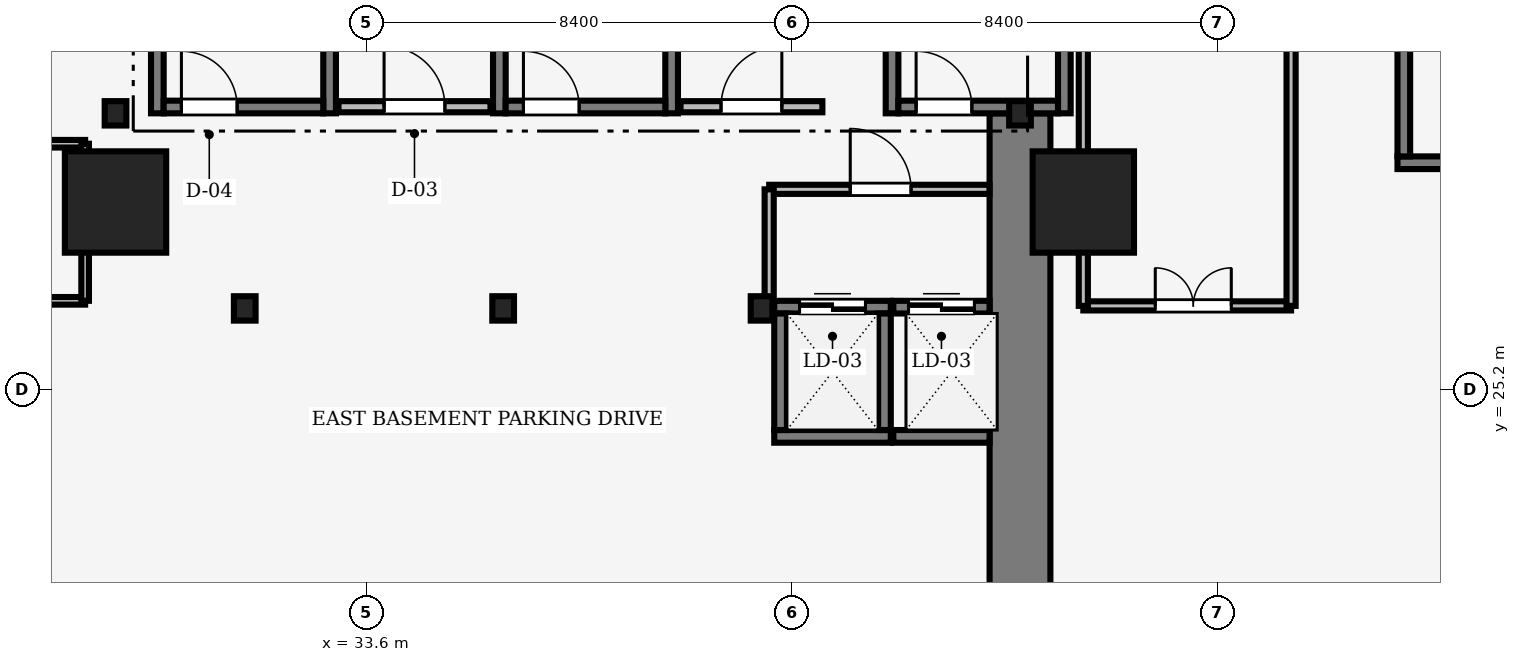
"""IFC4 building model, lengths in metres.
Left out: names, types, materials, properties, quantities, classifications, styles, units other than length and angle.
Written with IfcOpenShell. Run it as: python <this file> out.ifc"""

import sys

from ifc_helpers import new_model, si_unit, direction, frame, frame_2d, origin, origin_2d, place, context, subcontext, project, spatial, rectangle, i_section, extrude, source, transform, mapped, element, fill, save


model = new_model("IFC4")
c1 = context("Model", 3, precision=1e-05, world=origin(), true_north=direction((0.0, 1.0)))
c2 = subcontext(c1, "Body", "Model", "MODEL_VIEW")
j1 = project(units=[si_unit("LENGTHUNIT", "METRE"), si_unit("PLANEANGLEUNIT", "RADIAN")], contexts=[c1])
p1 = place(None, origin())
s1 = spatial("IfcSite", under=j1, at=p1, CompositionType="ELEMENT")
p2 = place(p1, origin())
s2 = spatial("IfcBuilding", under=s1, at=p2, CompositionType="ELEMENT")
p3 = place(p2, frame((0.0, 0.0, -11.4)))
s3 = spatial("IfcBuildingStorey", under=s2, at=p3, CompositionType="ELEMENT", Elevation=-11.4)
m1 = source(origin(), c2, "Body", "SweptSolid", [
    extrude(rectangle(XDim=13.15, YDim=1.2, at=frame_2d((6.575, 0.0))), origin(), (0.0, 0.0, 1.0), 5.04),
])
p4 = place(p3, frame((46.5, 17.5, 0.0), z_axis=(0.0, 0.0, 1.0), x_axis=(0.0, 1.0, 0.0)))
e1 = element("IfcWall", 1, at=p4, inside=s3, PredefinedType="SHEAR", context=c2, shape_type="MappedRepresentation", body=[
    mapped(m1, transform((0.0, 0.0, 0.0), scale=1.0)),
])
m2 = source(origin(), c2, "Body", "SweptSolid", [
    extrude(i_section(OverallWidth=0.428, OverallDepth=0.481, WebThickness=0.04, FlangeThickness=0.063, FilletRadius=0.015, at=origin_2d()), origin(), (0.0, 0.0, 1.0), 5.04),
])
for number, where, z_axis, x_axis in (
    (2, (41.4, 26.8, 0.0), (0.0, 0.0, 1.0), (1.0, 0.0, 0.0)),
    (3, (36.3, 26.8, 0.0), (0.0, 0.0, 1.0), (1.0, 0.0, 0.0)),
    (4, (31.2, 26.8, 0.0), (0.0, 0.0, 1.0), (1.0, 0.0, 0.0)),
    (5, (28.65, 30.65, 0.0), (0.0, 0.0, 1.0), (1.0, 0.0, 0.0)),
    (6, (46.5, 30.65, 0.0), (0.0, 0.0, 1.0), (1.0, 0.0, 0.0)),
):
    element("IfcColumn", number, at=place(p3, frame(where, z_axis=z_axis, x_axis=x_axis)), inside=s3, PredefinedType="COLUMN", context=c2, shape_type="MappedRepresentation", body=[
        mapped(m2, transform((0.0, 0.0, 0.0), scale=1.0)),
    ])
m3 = source(origin(), c2, "Body", "SweptSolid", [
    extrude(rectangle(XDim=2.0, YDim=2.0, at=origin_2d()), origin(), (0.0, 0.0, 1.0), 5.04),
])
for number, where, z_axis, x_axis in (
    (7, (28.65, 28.9, 0.0), (0.0, 0.0, 1.0), (1.0, 0.0, 0.0)),
    (8, (47.75, 28.9, 0.0), (0.0, 0.0, 1.0), (1.0, 0.0, 0.0)),
):
    element("IfcColumn", number, at=place(p3, frame(where, z_axis=z_axis, x_axis=x_axis)), inside=s3, PredefinedType="COLUMN", context=c2, shape_type="MappedRepresentation", body=[
        mapped(m3, transform((0.0, 0.0, 0.0), scale=1.0)),
    ])
m4 = source(origin(), c2, "Body", "SweptSolid", [
    extrude(rectangle(XDim=9.05, YDim=0.25, at=frame_2d((4.525, 0.0))), origin(), (0.0, 0.0, 1.0), 5.2),
])
for number, where, z_axis, x_axis in (
    (9, (29.475, 30.65, 0.0), (0.0, 0.0, 1.0), (0.0, 1.0, 0.0)),
    (10, (32.875, 30.65, 0.0), (0.0, 0.0, 1.0), (0.0, 1.0, 0.0)),
):
    element("IfcWall", number, at=place(p3, frame(where, z_axis=z_axis, x_axis=x_axis)), inside=s3, PredefinedType="SOLIDWALL", context=c2, shape_type="MappedRepresentation", body=[
        mapped(m4, transform((0.0, 0.0, 0.0), scale=1.0)),
    ])
m5 = source(origin(), c2, "Body", "SweptSolid", [
    extrude(rectangle(XDim=3.15, YDim=0.25, at=frame_2d((1.575, 0.0))), origin(), (0.0, 0.0, 1.0), 5.2),
])
p5 = place(p3, frame((29.6, 30.775, 0.0), z_axis=(0.0, 0.0, 1.0), x_axis=(1.0, 0.0, 0.0)))
e11 = element("IfcWall", 11, at=p5, inside=s3, PredefinedType="SOLIDWALL", context=c2, shape_type="MappedRepresentation", body=[
    mapped(m5, transform((0.0, 0.0, 0.0), scale=1.0)),
])
m6 = source(origin(), c2, "Body", "SweptSolid", [
    extrude(rectangle(XDim=1.1, YDim=2.2, at=frame_2d((0.55, 1.1))), frame((0.0, 0.135, 0.0), z_axis=(0.0, -1.0, 0.0), x_axis=(1.0, 0.0, 0.0)), (0.0, 0.0, 1.0), 0.27),
])
p6 = place(p5, frame((0.35, 0.0, 0.0)))
e12 = element("IfcOpeningElement", 12, at=p6, cuts=e11, PredefinedType="OPENING", context=c2, shape_type="MappedRepresentation", body=[
    mapped(m6, transform((0.0, 0.0, 0.0), scale=1.0)),
])
for number, where, z_axis, x_axis in (
    (13, (36.225, 30.65, 0.0), (0.0, 0.0, 1.0), (0.0, 1.0, 0.0)),
    (14, (39.625, 30.65, 0.0), (0.0, 0.0, 1.0), (0.0, 1.0, 0.0)),
):
    element("IfcWall", number, at=place(p3, frame(where, z_axis=z_axis, x_axis=x_axis)), inside=s3, PredefinedType="SOLIDWALL", context=c2, shape_type="MappedRepresentation", body=[
        mapped(m4, transform((0.0, 0.0, 0.0), scale=1.0)),
    ])
p7 = place(p3, frame((36.35, 30.775, 0.0), z_axis=(0.0, 0.0, 1.0), x_axis=(1.0, 0.0, 0.0)))
e15 = element("IfcWall", 15, at=p7, inside=s3, PredefinedType="SOLIDWALL", context=c2, shape_type="MappedRepresentation", body=[
    mapped(m5, transform((0.0, 0.0, 0.0), scale=1.0)),
])
p8 = place(p7, frame((0.35, 0.0, 0.0)))
e16 = element("IfcOpeningElement", 16, at=p8, cuts=e15, PredefinedType="OPENING", context=c2, shape_type="MappedRepresentation", body=[
    mapped(m6, transform((0.0, 0.0, 0.0), scale=1.0)),
])
for number, where, z_axis, x_axis in (
    (17, (43.975, 30.65, 0.0), (0.0, 0.0, 1.0), (0.0, 1.0, 0.0)),
    (18, (47.375, 30.65, 0.0), (0.0, 0.0, 1.0), (0.0, 1.0, 0.0)),
):
    element("IfcWall", number, at=place(p3, frame(where, z_axis=z_axis, x_axis=x_axis)), inside=s3, PredefinedType="SOLIDWALL", context=c2, shape_type="MappedRepresentation", body=[
        mapped(m4, transform((0.0, 0.0, 0.0), scale=1.0)),
    ])
p9 = place(p3, frame((44.1, 30.775, 0.0), z_axis=(0.0, 0.0, 1.0), x_axis=(1.0, 0.0, 0.0)))
e19 = element("IfcWall", 19, at=p9, inside=s3, PredefinedType="SOLIDWALL", context=c2, shape_type="MappedRepresentation", body=[
    mapped(m5, transform((0.0, 0.0, 0.0), scale=1.0)),
])
p10 = place(p9, frame((0.35, 0.0, 0.0)))
e20 = element("IfcOpeningElement", 20, at=p10, cuts=e19, PredefinedType="OPENING", context=c2, shape_type="MappedRepresentation", body=[
    mapped(m6, transform((0.0, 0.0, 0.0), scale=1.0)),
])
m7 = source(origin(), c2, "Body", "SweptSolid", [
    extrude(rectangle(XDim=9.9, YDim=0.25, at=frame_2d((4.95, 0.0))), origin(), (0.0, 0.0, 1.0), 5.2),
])
p11 = place(p3, frame((53.95, 29.675, 0.0), z_axis=(0.0, 0.0, 1.0), x_axis=(1.0, 0.0, 0.0)))
e21 = element("IfcWall", 21, at=p11, inside=s3, PredefinedType="SOLIDWALL", context=c2, shape_type="MappedRepresentation", body=[
    mapped(m7, transform((0.0, 0.0, 0.0), scale=1.0)),
])
m8 = source(origin(), c2, "Body", "SweptSolid", [
    extrude(rectangle(XDim=3.75, YDim=0.25, at=frame_2d((1.875, 0.0))), origin(), (0.0, 0.0, 1.0), 5.2),
])
p12 = place(p3, frame((54.075, 29.8, 0.0), z_axis=(0.0, 0.0, 1.0), x_axis=(0.0, 1.0, 0.0)))
e22 = element("IfcWall", 22, at=p12, inside=s3, PredefinedType="SOLIDWALL", context=c2, shape_type="MappedRepresentation", body=[
    mapped(m8, transform((0.0, 0.0, 0.0), scale=1.0)),
])
p13 = place(p12, frame((2.3, 0.0, 0.0)))
e23 = element("IfcOpeningElement", 23, at=p13, cuts=e22, PredefinedType="OPENING", context=c2, shape_type="MappedRepresentation", body=[
    mapped(m6, transform((0.0, 0.0, 0.0), scale=1.0)),
])
m9 = source(origin(), c2, "Body", "SweptSolid", [
    extrude(rectangle(XDim=3.0, YDim=0.22, at=frame_2d((1.5, 0.0))), origin(), (0.0, 0.0, 1.0), 5.04),
])
p14 = place(p3, frame((33.05, 30.78, 0.0), z_axis=(0.0, 0.0, 1.0), x_axis=(1.0, 0.0, 0.0)))
e24 = element("IfcWall", 24, at=p14, inside=s3, PredefinedType="SOLIDWALL", context=c2, shape_type="MappedRepresentation", body=[
    mapped(m9, transform((0.0, 0.0, 0.0), scale=1.0)),
])
m10 = source(origin(), c2, "Body", "SweptSolid", [
    extrude(rectangle(XDim=1.2, YDim=2.2, at=frame_2d((0.6, 1.1))), frame((0.0, 0.12, 0.0), z_axis=(0.0, -1.0, 0.0), x_axis=(1.0, 0.0, 0.0)), (0.0, 0.0, 1.0), 0.24),
])
p15 = place(p14, frame((0.9, 0.0, 0.0)))
e25 = element("IfcOpeningElement", 25, at=p15, cuts=e24, PredefinedType="OPENING", context=c2, shape_type="MappedRepresentation", body=[
    mapped(m10, transform((0.0, 0.0, 0.0), scale=1.0)),
])
m11 = source(origin(), c2, "Body", "SweptSolid", [
    extrude(rectangle(XDim=2.8, YDim=0.22, at=frame_2d((1.4, 0.0))), origin(), (0.0, 0.0, 1.0), 5.04),
])
p16 = place(p3, frame((39.8, 30.78, 0.0), z_axis=(0.0, 0.0, 1.0), x_axis=(1.0, 0.0, 0.0)))
e26 = element("IfcWall", 26, at=p16, inside=s3, PredefinedType="SOLIDWALL", context=c2, shape_type="MappedRepresentation", body=[
    mapped(m11, transform((0.0, 0.0, 0.0), scale=1.0)),
])
p17 = place(p16, frame((0.8, 0.0, 0.0)))
e27 = element("IfcOpeningElement", 27, at=p17, cuts=e26, PredefinedType="OPENING", context=c2, shape_type="MappedRepresentation", body=[
    mapped(m10, transform((0.0, 0.0, 0.0), scale=1.0)),
])
m12 = source(origin(), c2, "Body", "SweptSolid", [
    extrude(rectangle(XDim=2.3, YDim=0.25, at=frame_2d((1.15, 0.0))), origin(), (0.0, 0.0, 1.0), 5.04),
])
p18 = place(p3, frame((41.65, 24.275, 0.0), z_axis=(0.0, 0.0, 1.0), x_axis=(1.0, 0.0, 0.0)))
e28 = element("IfcWall", 28, at=p18, inside=s3, PredefinedType="SOLIDWALL", context=c2, shape_type="MappedRepresentation", body=[
    mapped(m12, transform((0.0, 0.0, 0.0), scale=1.0)),
])
p19 = place(p3, frame((41.65, 26.825, 0.0), z_axis=(0.0, 0.0, 1.0), x_axis=(1.0, 0.0, 0.0)))
e29 = element("IfcWall", 29, at=p19, inside=s3, PredefinedType="SOLIDWALL", context=c2, shape_type="MappedRepresentation", body=[
    mapped(m12, transform((0.0, 0.0, 0.0), scale=1.0)),
])
m13 = source(origin(), c2, "Body", "SweptSolid", [
    extrude(rectangle(XDim=1.3, YDim=2.3, at=frame_2d((0.65, 1.15))), frame((0.0, 0.135, 0.0), z_axis=(0.0, -1.0, 0.0), x_axis=(1.0, 0.0, 0.0)), (0.0, 0.0, 1.0), 0.27),
])
p20 = place(p19, frame((0.5, 0.0, 0.0)))
e30 = element("IfcOpeningElement", 30, at=p20, cuts=e29, PredefinedType="OPENING", context=c2, shape_type="MappedRepresentation", body=[
    mapped(m13, transform((0.0, 0.0, 0.0), scale=1.0)),
])
for number, where, z_axis, x_axis in (
    (31, (41.775, 24.4, 0.0), (0.0, 0.0, 1.0), (0.0, 1.0, 0.0)),
    (32, (43.825, 24.4, 0.0), (0.0, 0.0, 1.0), (0.0, 1.0, 0.0)),
):
    element("IfcWall", number, at=place(p3, frame(where, z_axis=z_axis, x_axis=x_axis)), inside=s3, PredefinedType="SOLIDWALL", context=c2, shape_type="MappedRepresentation", body=[
        mapped(m12, transform((0.0, 0.0, 0.0), scale=1.0)),
    ])
m14 = source(origin(), c2, "Body", "SweptSolid", [
    extrude(rectangle(XDim=1.9, YDim=0.25, at=frame_2d((0.95, 0.0))), origin(), (0.0, 0.0, 1.0), 5.04),
])
p21 = place(p3, frame((44.0, 24.275, 0.0), z_axis=(0.0, 0.0, 1.0), x_axis=(1.0, 0.0, 0.0)))
e33 = element("IfcWall", 33, at=p21, inside=s3, PredefinedType="SOLIDWALL", context=c2, shape_type="MappedRepresentation", body=[
    mapped(m14, transform((0.0, 0.0, 0.0), scale=1.0)),
])
p22 = place(p3, frame((44.0, 26.825, 0.0), z_axis=(0.0, 0.0, 1.0), x_axis=(1.0, 0.0, 0.0)))
e34 = element("IfcWall", 34, at=p22, inside=s3, PredefinedType="SOLIDWALL", context=c2, shape_type="MappedRepresentation", body=[
    mapped(m14, transform((0.0, 0.0, 0.0), scale=1.0)),
])
p23 = place(p22, frame((0.3, 0.0, 0.0)))
e35 = element("IfcOpeningElement", 35, at=p23, cuts=e34, PredefinedType="OPENING", context=c2, shape_type="MappedRepresentation", body=[
    mapped(m13, transform((0.0, 0.0, 0.0), scale=1.0)),
])
m15 = source(origin(), c2, "Body", "SweptSolid", [
    extrude(rectangle(XDim=4.348, YDim=0.18, at=frame_2d((2.174, 0.0))), origin(), (0.0, 0.0, 1.0), 5.04),
])
p24 = place(p3, frame((41.55, 29.15, 0.0), z_axis=(0.0, 0.0, 1.0), x_axis=(1.0, 0.0, 0.0)))
e36 = element("IfcWall", 36, at=p24, inside=s3, PredefinedType="PARTITIONING", context=c2, shape_type="MappedRepresentation", body=[
    mapped(m15, transform((0.0, 0.0, 0.0), scale=1.0)),
])
m16 = source(origin(), c2, "Body", "SweptSolid", [
    extrude(rectangle(XDim=1.2, YDim=2.2, at=frame_2d((0.6, 1.1))), frame((0.0, 0.1, 0.0), z_axis=(0.0, -1.0, 0.0), x_axis=(1.0, 0.0, 0.0)), (0.0, 0.0, 1.0), 0.2),
])
p25 = place(p24, frame((1.6, 0.0, 0.0)))
e37 = element("IfcOpeningElement", 37, at=p25, cuts=e36, PredefinedType="OPENING", context=c2, shape_type="MappedRepresentation", body=[
    mapped(m16, transform((0.0, 0.0, 0.0), scale=1.0)),
])
m17 = source(origin(), c2, "Body", "SweptSolid", [
    extrude(rectangle(XDim=4.1, YDim=0.18, at=frame_2d((2.05, 0.0))), origin(), (0.0, 0.0, 1.0), 4.432),
])
p26 = place(p3, frame((47.75, 26.85, 0.0), z_axis=(0.0, 0.0, 1.0), x_axis=(1.0, 0.0, 0.0)))
e38 = element("IfcWall", 38, at=p26, inside=s3, PredefinedType="PARTITIONING", context=c2, shape_type="MappedRepresentation", body=[
    mapped(m17, transform((0.0, 0.0, 0.0), scale=1.0)),
])
m18 = source(origin(), c2, "Body", "SweptSolid", [
    extrude(rectangle(XDim=1.5, YDim=2.3, at=frame_2d((0.75, 1.15))), frame((0.0, 0.1, 0.0), z_axis=(0.0, -1.0, 0.0), x_axis=(1.0, 0.0, 0.0)), (0.0, 0.0, 1.0), 0.2),
])
p27 = place(p26, frame((1.42, 0.0, 0.0)))
e39 = element("IfcOpeningElement", 39, at=p27, cuts=e38, PredefinedType="OPENING", context=c2, shape_type="MappedRepresentation", body=[
    mapped(m18, transform((0.0, 0.0, 0.0), scale=1.0)),
])
m19 = source(origin(), c2, "Body", "SweptSolid", [
    extrude(rectangle(XDim=3.3, YDim=0.15, at=frame_2d((1.65, 0.0))), origin(), (0.0, 0.0, 1.0), 5.04),
])
p28 = place(p3, frame((24.75, 26.95, 0.0), z_axis=(0.0, 0.0, 1.0), x_axis=(1.0, 0.0, 0.0)))
e40 = element("IfcWall", 40, at=p28, inside=s3, PredefinedType="PARTITIONING", context=c2, shape_type="MappedRepresentation", body=[
    mapped(m19, transform((0.0, 0.0, 0.0), scale=1.0)),
])
m20 = source(origin(), c2, "Body", "SweptSolid", [
    extrude(rectangle(XDim=0.92, YDim=2.1, at=frame_2d((0.46, 1.05))), frame((0.0, 0.085, 0.0), z_axis=(0.0, -1.0, 0.0), x_axis=(1.0, 0.0, 0.0)), (0.0, 0.0, 1.0), 0.17),
])
p29 = place(p28, frame((0.9, 0.0, 0.0)))
e41 = element("IfcOpeningElement", 41, at=p29, cuts=e40, PredefinedType="OPENING", context=c2, shape_type="MappedRepresentation", body=[
    mapped(m20, transform((0.0, 0.0, 0.0), scale=1.0)),
])
m21 = source(origin(), c2, "Body", "SweptSolid", [
    extrude(rectangle(XDim=9.0, YDim=0.18, at=frame_2d((4.5, 0.0))), origin(), (0.0, 0.0, 1.0), 4.432),
])
p30 = place(p3, frame((47.75, 26.85, 0.0), z_axis=(0.0, 0.0, 1.0), x_axis=(0.0, 1.0, 0.0)))
e42 = element("IfcWall", 42, at=p30, inside=s3, PredefinedType="PARTITIONING", context=c2, shape_type="MappedRepresentation", body=[
    mapped(m21, transform((0.0, 0.0, 0.0), scale=1.0)),
])
m22 = source(origin(), c2, "Body", "SweptSolid", [
    extrude(rectangle(XDim=9.0, YDim=0.18, at=frame_2d((4.5, 0.0))), origin(), (0.0, 0.0, 1.0), 4.508),
])
p31 = place(p3, frame((51.85, 26.85, 0.0), z_axis=(0.0, 0.0, 1.0), x_axis=(0.0, 1.0, 0.0)))
e43 = element("IfcWall", 43, at=p31, inside=s3, PredefinedType="PARTITIONING", context=c2, shape_type="MappedRepresentation", body=[
    mapped(m22, transform((0.0, 0.0, 0.0), scale=1.0)),
])
p32 = place(p3, frame((24.75, 30.05, 0.0), z_axis=(0.0, 0.0, 1.0), x_axis=(1.0, 0.0, 0.0)))
e44 = element("IfcWall", 44, at=p32, inside=s3, PredefinedType="PARTITIONING", context=c2, shape_type="MappedRepresentation", body=[
    mapped(m19, transform((0.0, 0.0, 0.0), scale=1.0)),
])
m23 = source(origin(), c2, "Body", "SweptSolid", [
    extrude(rectangle(XDim=3.1, YDim=0.15, at=frame_2d((1.55, 0.0))), origin(), (0.0, 0.0, 1.0), 4.508),
])
p33 = place(p3, frame((28.05, 26.95, 0.0), z_axis=(0.0, 0.0, 1.0), x_axis=(0.0, 1.0, 0.0)))
e45 = element("IfcWall", 45, at=p33, inside=s3, PredefinedType="PARTITIONING", context=c2, shape_type="MappedRepresentation", body=[
    mapped(m23, transform((0.0, 0.0, 0.0), scale=1.0)),
])
m24 = source(origin(), c2, "Body", "SweptSolid", [
    extrude(rectangle(XDim=2.35, YDim=0.18, at=frame_2d((1.175, 0.0))), origin(), (0.0, 0.0, 1.0), 5.04),
])
p34 = place(p3, frame((41.55, 26.8, 0.0), z_axis=(0.0, 0.0, 1.0), x_axis=(0.0, 1.0, 0.0)))
e46 = element("IfcWall", 46, at=p34, inside=s3, PredefinedType="PARTITIONING", context=c2, shape_type="MappedRepresentation", body=[
    mapped(m24, transform((0.0, 0.0, 0.0), scale=1.0)),
])
m25 = source(origin(), c2, "Body", "SweptSolid", [
    extrude(rectangle(XDim=1.1, YDim=2.2, at=frame_2d((0.55, 1.1))), frame((0.0, 0.025, 0.0), z_axis=(0.0, -1.0, 0.0), x_axis=(1.0, 0.0, 0.0)), (0.0, 0.0, 1.0), 0.05),
])
p35 = place(p6, origin())
e47 = element("IfcDoor", 47, at=p35, inside=s3, OperationType="SINGLE_SWING_LEFT", PredefinedType="DOOR", context=c2, shape_type="MappedRepresentation", body=[
    mapped(m25, transform((0.0, 0.0, 0.0), scale=1.0)),
])
fill(e12, e47)
p36 = place(p8, origin())
e48 = element("IfcDoor", 48, at=p36, inside=s3, OperationType="SINGLE_SWING_LEFT", PredefinedType="DOOR", context=c2, shape_type="MappedRepresentation", body=[
    mapped(m25, transform((0.0, 0.0, 0.0), scale=1.0)),
])
fill(e16, e48)
p37 = place(p10, origin())
e49 = element("IfcDoor", 49, at=p37, inside=s3, OperationType="SINGLE_SWING_LEFT", PredefinedType="DOOR", context=c2, shape_type="MappedRepresentation", body=[
    mapped(m25, transform((0.0, 0.0, 0.0), scale=1.0)),
])
fill(e20, e49)
m26 = source(origin(), c2, "Body", "SweptSolid", [
    extrude(rectangle(XDim=1.2, YDim=2.2, at=frame_2d((0.6, 1.1))), frame((0.0, 0.025, 0.0), z_axis=(0.0, -1.0, 0.0), x_axis=(1.0, 0.0, 0.0)), (0.0, 0.0, 1.0), 0.05),
])
p38 = place(p15, origin())
e50 = element("IfcDoor", 50, at=p38, inside=s3, OperationType="SINGLE_SWING_LEFT", PredefinedType="DOOR", context=c2, shape_type="MappedRepresentation", body=[
    mapped(m26, transform((0.0, 0.0, 0.0), scale=1.0)),
])
fill(e25, e50)
p39 = place(p17, origin())
e51 = element("IfcDoor", 51, at=p39, inside=s3, OperationType="SINGLE_SWING_RIGHT", PredefinedType="DOOR", context=c2, shape_type="MappedRepresentation", body=[
    mapped(m26, transform((0.0, 0.0, 0.0), scale=1.0)),
])
fill(e27, e51)
m27 = source(origin(), c2, "Body", "SweptSolid", [
    extrude(rectangle(XDim=1.3, YDim=2.3, at=frame_2d((0.65, 1.15))), frame((0.0, 0.025, 0.0), z_axis=(0.0, -1.0, 0.0), x_axis=(1.0, 0.0, 0.0)), (0.0, 0.0, 1.0), 0.05),
])
p40 = place(p20, origin())
e52 = element("IfcDoor", 52, at=p40, inside=s3, OperationType="DOUBLE_DOOR_SLIDING", PredefinedType="DOOR", context=c2, shape_type="MappedRepresentation", body=[
    mapped(m27, transform((0.0, 0.0, 0.0), scale=1.0)),
])
fill(e30, e52)
p41 = place(p23, origin())
e53 = element("IfcDoor", 53, at=p41, inside=s3, OperationType="DOUBLE_DOOR_SLIDING", PredefinedType="DOOR", context=c2, shape_type="MappedRepresentation", body=[
    mapped(m27, transform((0.0, 0.0, 0.0), scale=1.0)),
])
fill(e35, e53)
p42 = place(p25, origin())
e54 = element("IfcDoor", 54, at=p42, inside=s3, OperationType="SINGLE_SWING_LEFT", PredefinedType="DOOR", context=c2, shape_type="MappedRepresentation", body=[
    mapped(m26, transform((0.0, 0.0, 0.0), scale=1.0)),
])
fill(e37, e54)
m28 = source(origin(), c2, "Body", "SweptSolid", [
    extrude(rectangle(XDim=1.5, YDim=2.3, at=frame_2d((0.75, 1.15))), frame((0.0, 0.025, 0.0), z_axis=(0.0, -1.0, 0.0), x_axis=(1.0, 0.0, 0.0)), (0.0, 0.0, 1.0), 0.05),
])
p43 = place(p27, origin())
e55 = element("IfcDoor", 55, at=p43, inside=s3, OperationType="DOUBLE_DOOR_SINGLE_SWING", PredefinedType="DOOR", context=c2, shape_type="MappedRepresentation", body=[
    mapped(m28, transform((0.0, 0.0, 0.0), scale=1.0)),
])
fill(e39, e55)
save(model, sys.argv[1])
